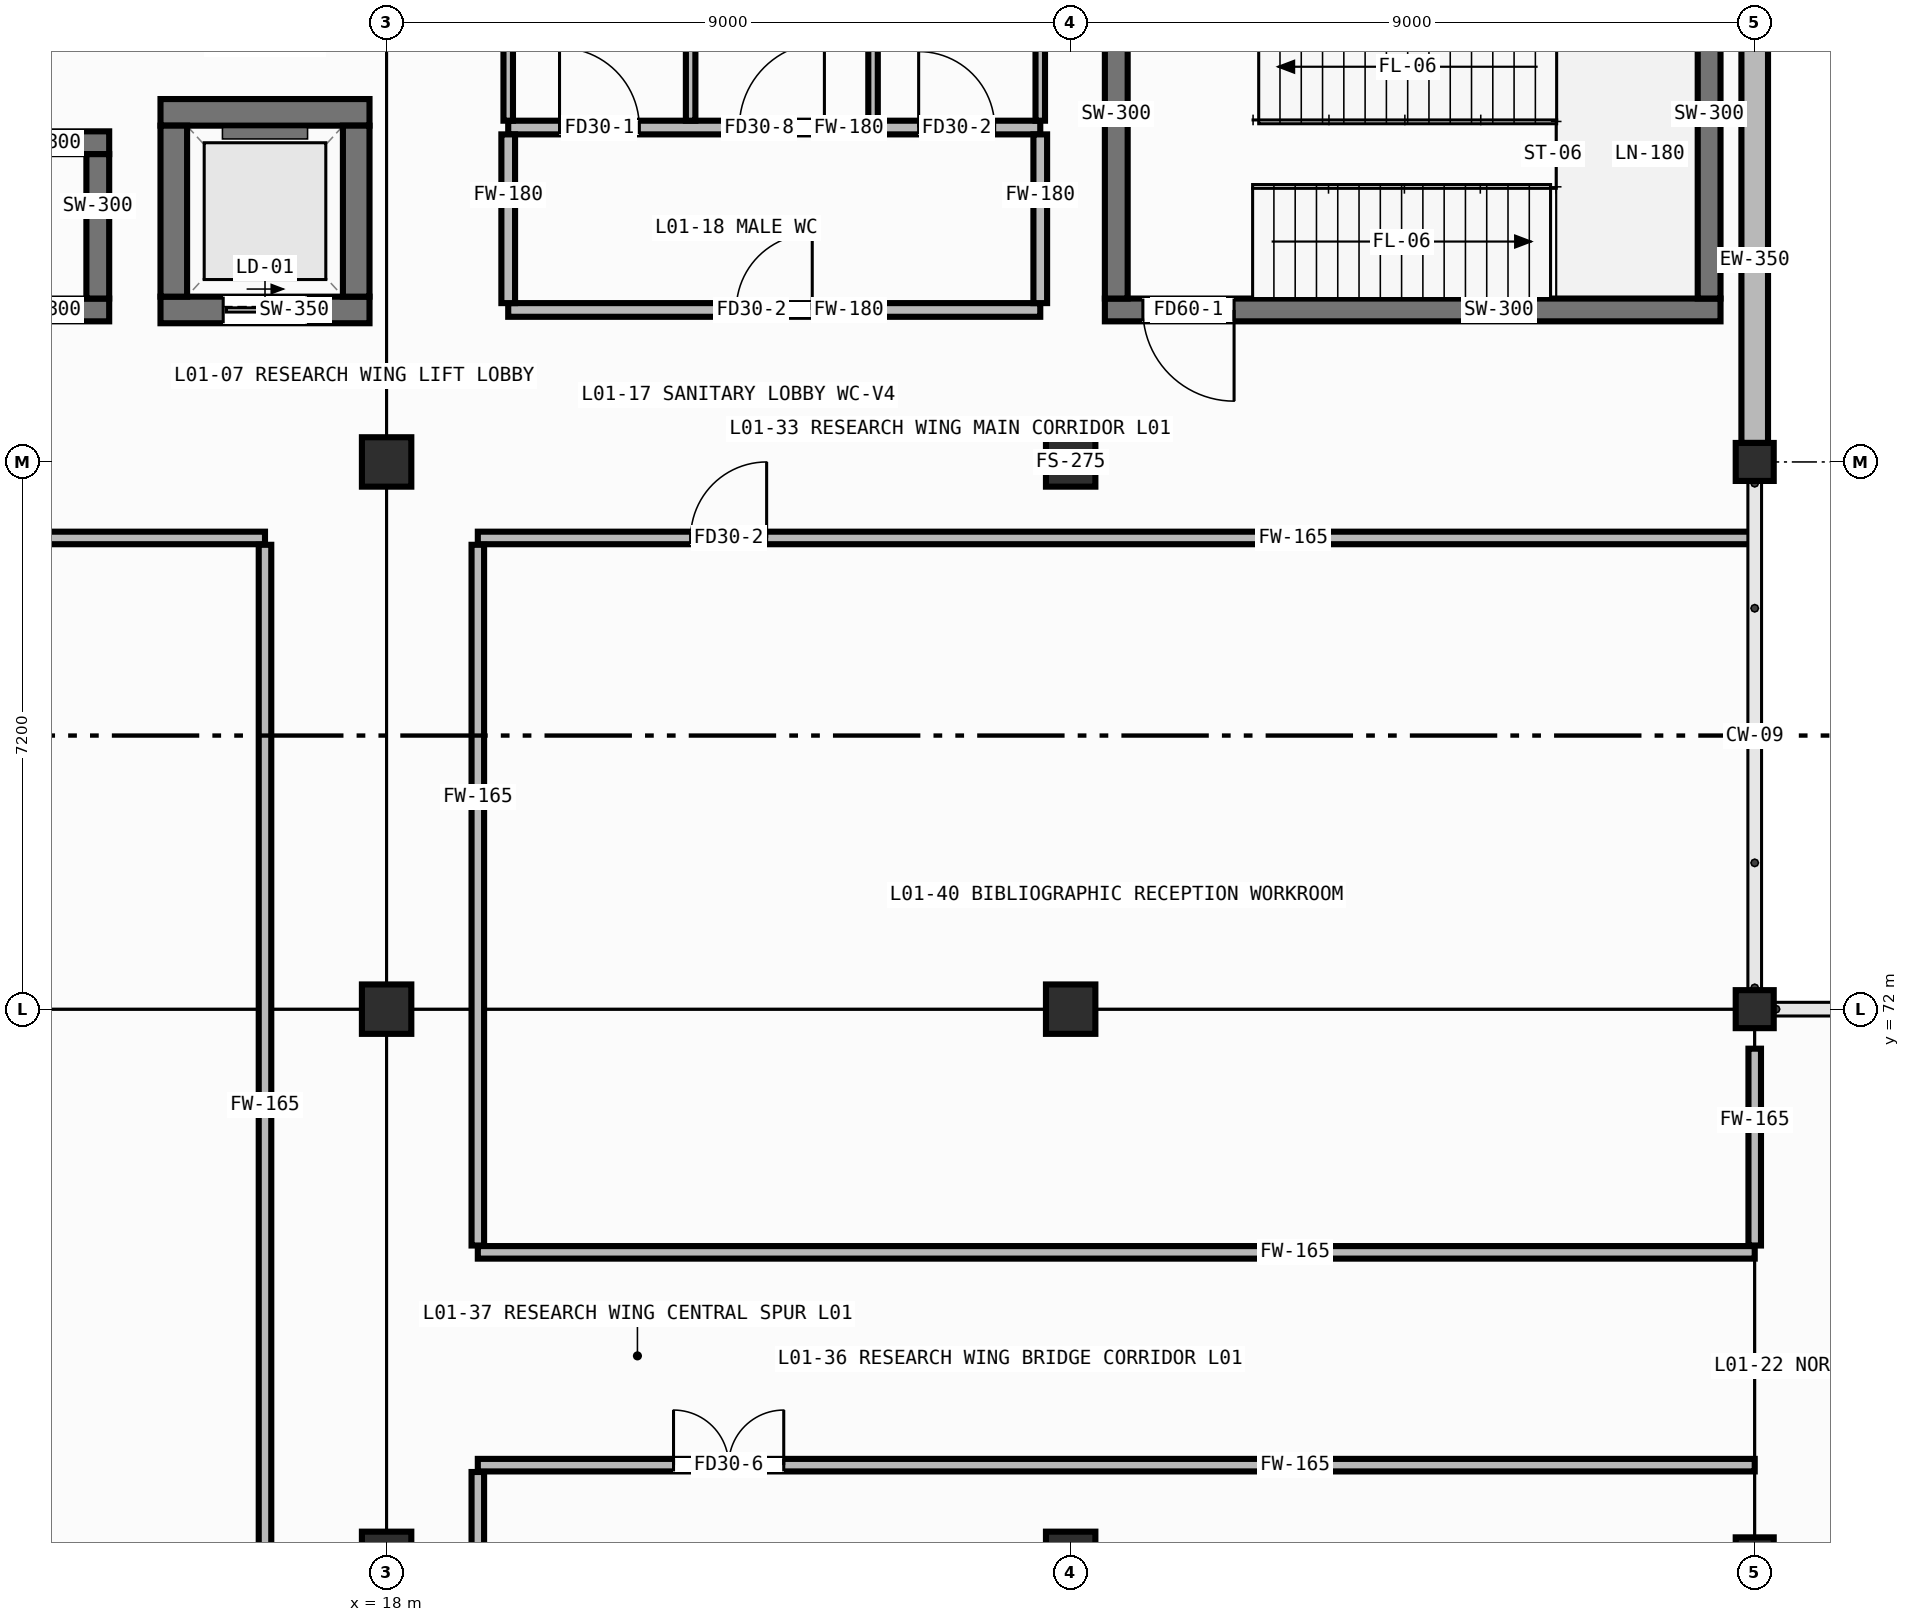
"""IFC4 building model, lengths in metres.
Left out: names, types, materials, properties, quantities, classifications, styles, units other than length and angle.
Written with IfcOpenShell. Run it as: python <this file> out.ifc"""

import sys

from ifc_helpers import new_model, si_unit, direction, frame, frame_2d, origin, origin_2d, place, context, subcontext, project, spatial, rectangle, hollow_rectangle, extrude, element, fill, save


model = new_model("IFC4")
c1 = context("Model", 3, precision=1e-05, world=origin(), true_north=direction((0.0, 1.0)))
c2 = subcontext(c1, "Body", "Model", "MODEL_VIEW")
j1 = project(units=[si_unit("LENGTHUNIT", "METRE"), si_unit("PLANEANGLEUNIT", "RADIAN")], contexts=[c1])
p1 = place(None, origin())
s1 = spatial("IfcSite", under=j1, at=p1, CompositionType="ELEMENT")
p2 = place(p1, origin())
s2 = spatial("IfcBuilding", under=s1, at=p2, CompositionType="ELEMENT")
p3 = place(p2, origin())
s3 = spatial("IfcBuildingStorey", under=s2, at=p3, CompositionType="ELEMENT", Elevation=0.0)
for number, where, z_axis, x_axis in (
    (1, (18.0, 64.8, 0.0), (0.0, 0.0, 1.0), (1.0, 0.0, 0.0)),
    (2, (18.0, 72.0, 0.0), (0.0, 0.0, 1.0), (1.0, 0.0, 0.0)),
    (3, (18.0, 79.2, 0.0), (0.0, 0.0, 1.0), (1.0, 0.0, 0.0)),
    (4, (27.0, 64.8, 0.0), (0.0, 0.0, 1.0), (1.0, 0.0, 0.0)),
    (5, (27.0, 72.0, 0.0), (0.0, 0.0, 1.0), (1.0, 0.0, 0.0)),
    (6, (27.0, 79.2, 0.0), (0.0, 0.0, 1.0), (1.0, 0.0, 0.0)),
):
    element("IfcColumn", number, at=place(p3, frame(where, z_axis=z_axis, x_axis=x_axis)), inside=s3, PredefinedType="COLUMN", context=c2, shape_type="SweptSolid", body=[
        extrude(hollow_rectangle(XDim=0.65, YDim=0.65, WallThickness=0.025, at=origin_2d()), origin(), (0.0, 0.0, 1.0), 4.8),
    ])
for number, where, z_axis, x_axis in (
    (7, (36.0, 64.8, 0.0), (0.0, 0.0, 1.0), (1.0, 0.0, 0.0)),
    (8, (36.0, 72.0, 0.0), (0.0, 0.0, 1.0), (1.0, 0.0, 0.0)),
    (9, (36.0, 79.2, 0.0), (0.0, 0.0, 1.0), (1.0, 0.0, 0.0)),
):
    element("IfcColumn", number, at=place(p3, frame(where, z_axis=z_axis, x_axis=x_axis)), inside=s3, PredefinedType="COLUMN", context=c2, shape_type="SweptSolid", body=[
        extrude(hollow_rectangle(XDim=0.5, YDim=0.5, WallThickness=0.022, at=origin_2d()), origin(), (0.0, 0.0, 1.0), 4.8),
    ])
p4 = place(p3, frame((36.0, 86.15, 0.0), z_axis=(0.0, 0.0, 1.0), x_axis=(0.0, -1.0, 0.0)))
e10 = element("IfcWall", 10, at=p4, inside=s3, PredefinedType="STANDARD", context=c2, shape_type="SweptSolid", body=[
    extrude(rectangle(XDim=6.7, YDim=0.35, at=frame_2d((3.35, 0.0))), origin(), (0.0, 0.0, 1.0), 4.055),
])
p5 = place(p3, frame((27.45, 81.2, 0.0), z_axis=(0.0, 0.0, 1.0), x_axis=(1.0, 0.0, 0.0)))
e11 = element("IfcWall", 11, at=p5, inside=s3, PredefinedType="SHEAR", context=c2, shape_type="SweptSolid", body=[
    extrude(rectangle(XDim=8.1, YDim=0.3, at=frame_2d((4.05, 0.0))), origin(), (0.0, 0.0, 1.0), 4.555),
])
p6 = place(p5, frame((0.5, 0.0, 0.0)))
e12 = element("IfcOpeningElement", 12, at=p6, cuts=e11, PredefinedType="OPENING", context=c2, shape_type="SweptSolid", body=[
    extrude(rectangle(XDim=1.2, YDim=2.1, at=frame_2d((0.6, 1.05))), frame((0.0, 0.162, 0.0), z_axis=(0.0, -1.0, 0.0), x_axis=(1.0, 0.0, 0.0)), (0.0, 0.0, 1.0), 0.324),
])
for number, where, z_axis, x_axis in (
    (13, (27.6, 81.35, 0.0), (0.0, 0.0, 1.0), (0.0, 1.0, 0.0)),
    (14, (35.4, 81.35, 0.0), (0.0, 0.0, 1.0), (0.0, 1.0, 0.0)),
):
    element("IfcWall", number, at=place(p3, frame(where, z_axis=z_axis, x_axis=x_axis)), inside=s3, PredefinedType="SHEAR", context=c2, shape_type="SweptSolid", body=[
        extrude(rectangle(XDim=3.8, YDim=0.3, at=frame_2d((1.9, 0.0))), origin(), (0.0, 0.0, 1.0), 4.555),
    ])
p7 = place(p3, frame((15.025, 81.2, 0.0), z_axis=(0.0, 0.0, 1.0), x_axis=(1.0, 0.0, 0.0)))
e15 = element("IfcWall", 15, at=p7, inside=s3, PredefinedType="SHEAR", context=c2, shape_type="SweptSolid", body=[
    extrude(rectangle(XDim=2.75, YDim=0.35, at=frame_2d((1.375, 0.0))), origin(), (0.0, 0.0, 1.0), 4.555),
])
p8 = place(p7, frame((0.825, 0.0, 0.0)))
e16 = element("IfcOpeningElement", 16, at=p8, cuts=e15, PredefinedType="OPENING", context=c2, shape_type="SweptSolid", body=[
    extrude(rectangle(XDim=1.1, YDim=2.1, at=frame_2d((0.55, 1.05))), frame((0.0, 0.187, 0.0), z_axis=(0.0, -1.0, 0.0), x_axis=(1.0, 0.0, 0.0)), (0.0, 0.0, 1.0), 0.374),
])
p9 = place(p3, frame((15.025, 83.8, 0.0), z_axis=(0.0, 0.0, 1.0), x_axis=(1.0, 0.0, 0.0)))
e17 = element("IfcWall", 17, at=p9, inside=s3, PredefinedType="SHEAR", context=c2, shape_type="SweptSolid", body=[
    extrude(rectangle(XDim=2.75, YDim=0.35, at=frame_2d((1.375, 0.0))), origin(), (0.0, 0.0, 1.0), 4.555),
])
for number, where, z_axis, x_axis in (
    (18, (15.2, 81.375, 0.0), (0.0, 0.0, 1.0), (0.0, 1.0, 0.0)),
    (19, (17.6, 81.375, 0.0), (0.0, 0.0, 1.0), (0.0, 1.0, 0.0)),
):
    element("IfcWall", number, at=place(p3, frame(where, z_axis=z_axis, x_axis=x_axis)), inside=s3, PredefinedType="SHEAR", context=c2, shape_type="SweptSolid", body=[
        extrude(rectangle(XDim=2.25, YDim=0.35, at=frame_2d((1.125, 0.0))), origin(), (0.0, 0.0, 1.0), 4.555),
    ])
for number, where, z_axis, x_axis in (
    (20, (12.05, 81.2, 0.0), (0.0, 0.0, 1.0), (1.0, 0.0, 0.0)),
    (21, (12.05, 83.4, 0.0), (0.0, 0.0, 1.0), (1.0, 0.0, 0.0)),
):
    element("IfcWall", number, at=place(p3, frame(where, z_axis=z_axis, x_axis=x_axis)), inside=s3, PredefinedType="SHEAR", context=c2, shape_type="SweptSolid", body=[
        extrude(rectangle(XDim=2.3, YDim=0.3, at=frame_2d((1.15, 0.0))), origin(), (0.0, 0.0, 1.0), 4.555),
    ])
p10 = place(p3, frame((14.2, 81.35, 0.0), z_axis=(0.0, 0.0, 1.0), x_axis=(0.0, 1.0, 0.0)))
e22 = element("IfcWall", 22, at=p10, inside=s3, PredefinedType="SHEAR", context=c2, shape_type="SweptSolid", body=[
    extrude(rectangle(XDim=1.9, YDim=0.3, at=frame_2d((0.95, 0.0))), origin(), (0.0, 0.0, 1.0), 4.555),
])
p11 = place(p3, frame((19.6, 81.2, 0.0), z_axis=(0.0, 0.0, 1.0), x_axis=(1.0, 0.0, 0.0)))
e23 = element("IfcWall", 23, at=p11, inside=s3, PredefinedType="PARTITIONING", context=c2, shape_type="SweptSolid", body=[
    extrude(rectangle(XDim=7.0, YDim=0.18, at=frame_2d((3.5, 0.0))), origin(), (0.0, 0.0, 1.0), 4.555),
])
p12 = place(p11, frame((3.0, 0.0, 0.0)))
e24 = element("IfcOpeningElement", 24, at=p12, cuts=e23, PredefinedType="OPENING", context=c2, shape_type="SweptSolid", body=[
    extrude(rectangle(XDim=1.0, YDim=2.08, at=frame_2d((0.5, 1.04))), frame((0.0, 0.102, 0.0), z_axis=(0.0, -1.0, 0.0), x_axis=(1.0, 0.0, 0.0)), (0.0, 0.0, 1.0), 0.204),
])
p13 = place(p3, frame((19.6, 83.6, 0.0), z_axis=(0.0, 0.0, 1.0), x_axis=(1.0, 0.0, 0.0)))
e25 = element("IfcWall", 25, at=p13, inside=s3, PredefinedType="PARTITIONING", context=c2, shape_type="SweptSolid", body=[
    extrude(rectangle(XDim=7.0, YDim=0.18, at=frame_2d((3.5, 0.0))), origin(), (0.0, 0.0, 1.0), 4.555),
])
p14 = place(p13, frame((0.675, 0.0, 0.0)))
e26 = element("IfcOpeningElement", 26, at=p14, cuts=e25, PredefinedType="OPENING", context=c2, shape_type="SweptSolid", body=[
    extrude(rectangle(XDim=1.05, YDim=2.1, at=frame_2d((0.525, 1.05))), frame((0.0, 0.102, 0.0), z_axis=(0.0, -1.0, 0.0), x_axis=(1.0, 0.0, 0.0)), (0.0, 0.0, 1.0), 0.204),
])
p15 = place(p13, frame((3.04, 0.0, 0.0)))
e27 = element("IfcOpeningElement", 27, at=p15, cuts=e25, PredefinedType="OPENING", context=c2, shape_type="SweptSolid", body=[
    extrude(rectangle(XDim=1.12, YDim=2.08, at=frame_2d((0.56, 1.04))), frame((0.0, 0.102, 0.0), z_axis=(0.0, -1.0, 0.0), x_axis=(1.0, 0.0, 0.0)), (0.0, 0.0, 1.0), 0.204),
])
p16 = place(p13, frame((5.4, 0.0, 0.0)))
e28 = element("IfcOpeningElement", 28, at=p16, cuts=e25, PredefinedType="OPENING", context=c2, shape_type="SweptSolid", body=[
    extrude(rectangle(XDim=1.0, YDim=2.08, at=frame_2d((0.5, 1.04))), frame((0.0, 0.102, 0.0), z_axis=(0.0, -1.0, 0.0), x_axis=(1.0, 0.0, 0.0)), (0.0, 0.0, 1.0), 0.204),
])
for number, where, z_axis, x_axis in (
    (29, (19.6, 81.29, 0.0), (0.0, 0.0, 1.0), (0.0, 1.0, 0.0)),
    (30, (26.6, 81.29, 0.0), (0.0, 0.0, 1.0), (0.0, 1.0, 0.0)),
):
    element("IfcWall", number, at=place(p3, frame(where, z_axis=z_axis, x_axis=x_axis)), inside=s3, PredefinedType="PARTITIONING", context=c2, shape_type="SweptSolid", body=[
        extrude(rectangle(XDim=2.22, YDim=0.18, at=frame_2d((1.11, 0.0))), origin(), (0.0, 0.0, 1.0), 4.555),
    ])
for number, where, z_axis, x_axis in (
    (31, (19.6, 83.69, 0.0), (0.0, 0.0, 1.0), (0.0, 1.0, 0.0)),
    (32, (22.0, 83.69, 0.0), (0.0, 0.0, 1.0), (0.0, 1.0, 0.0)),
    (33, (24.4, 83.69, 0.0), (0.0, 0.0, 1.0), (0.0, 1.0, 0.0)),
    (34, (26.6, 83.69, 0.0), (0.0, 0.0, 1.0), (0.0, 1.0, 0.0)),
):
    element("IfcWall", number, at=place(p3, frame(where, z_axis=z_axis, x_axis=x_axis)), inside=s3, PredefinedType="PARTITIONING", context=c2, shape_type="SweptSolid", body=[
        extrude(rectangle(XDim=2.448, YDim=0.125, at=frame_2d((1.224, 0.0))), origin(), (0.0, 0.0, 1.0), 4.555),
    ])
p17 = place(p3, frame((0.18, 78.2, 0.0), z_axis=(0.0, 0.0, 1.0), x_axis=(1.0, 0.0, 0.0)))
e35 = element("IfcWall", 35, at=p17, inside=s3, PredefinedType="PARTITIONING", context=c2, shape_type="SweptSolid", body=[
    extrude(rectangle(XDim=16.22, YDim=0.165, at=frame_2d((8.11, 0.0))), origin(), (0.0, 0.0, 1.0), 4.555),
])
p18 = place(p17, frame((3.47, 0.0, 0.0)))
e36 = element("IfcOpeningElement", 36, at=p18, cuts=e35, PredefinedType="OPENING", context=c2, shape_type="SweptSolid", body=[
    extrude(rectangle(XDim=1.7, YDim=2.12, at=frame_2d((0.85, 1.06))), frame((0.0, 0.094, 0.0), z_axis=(0.0, -1.0, 0.0), x_axis=(1.0, 0.0, 0.0)), (0.0, 0.0, 1.0), 0.189),
])
p19 = place(p3, frame((16.4, 57.635, 0.0), z_axis=(0.0, 0.0, 1.0), x_axis=(0.0, 1.0, 0.0)))
e37 = element("IfcWall", 37, at=p19, inside=s3, PredefinedType="PARTITIONING", context=c2, shape_type="SweptSolid", body=[
    extrude(rectangle(XDim=20.475, YDim=0.165, at=frame_2d((10.238, 0.0))), origin(), (0.0, 0.0, 1.0), 4.555),
])
p20 = place(p3, frame((19.2, 66.0, 0.0), z_axis=(0.0, 0.0, 1.0), x_axis=(1.0, 0.0, 0.0)))
e38 = element("IfcWall", 38, at=p20, inside=s3, PredefinedType="PARTITIONING", context=c2, shape_type="SweptSolid", body=[
    extrude(rectangle(XDim=16.8, YDim=0.165, at=frame_2d((8.4, 0.0))), origin(), (0.0, 0.0, 1.0), 4.555),
])
p21 = place(p20, frame((2.575, 0.0, 0.0)))
e39 = element("IfcOpeningElement", 39, at=p21, cuts=e38, PredefinedType="OPENING", context=c2, shape_type="SweptSolid", body=[
    extrude(rectangle(XDim=1.45, YDim=2.1, at=frame_2d((0.725, 1.05))), frame((0.0, 0.094, 0.0), z_axis=(0.0, -1.0, 0.0), x_axis=(1.0, 0.0, 0.0)), (0.0, 0.0, 1.0), 0.189),
])
p22 = place(p3, frame((19.2, 57.78, 0.0), z_axis=(0.0, 0.0, 1.0), x_axis=(0.0, 1.0, 0.0)))
e40 = element("IfcWall", 40, at=p22, inside=s3, PredefinedType="PARTITIONING", context=c2, shape_type="SweptSolid", body=[
    extrude(rectangle(XDim=8.13, YDim=0.165, at=frame_2d((4.065, 0.0))), origin(), (0.0, 0.0, 1.0), 4.555),
])
p23 = place(p3, frame((19.2, 68.8, 0.0), z_axis=(0.0, 0.0, 1.0), x_axis=(1.0, 0.0, 0.0)))
e41 = element("IfcWall", 41, at=p23, inside=s3, PredefinedType="PARTITIONING", context=c2, shape_type="SweptSolid", body=[
    extrude(rectangle(XDim=16.8, YDim=0.165, at=frame_2d((8.4, 0.0))), origin(), (0.0, 0.0, 1.0), 4.555),
])
p24 = place(p3, frame((19.2, 78.2, 0.0), z_axis=(0.0, 0.0, 1.0), x_axis=(1.0, 0.0, 0.0)))
e42 = element("IfcWall", 42, at=p24, inside=s3, PredefinedType="PARTITIONING", context=c2, shape_type="SweptSolid", body=[
    extrude(rectangle(XDim=16.765, YDim=0.165, at=frame_2d((8.383, 0.0))), origin(), (0.0, 0.0, 1.0), 4.555),
])
p25 = place(p24, frame((2.8, 0.0, 0.0)))
e43 = element("IfcOpeningElement", 43, at=p25, cuts=e42, PredefinedType="OPENING", context=c2, shape_type="SweptSolid", body=[
    extrude(rectangle(XDim=1.0, YDim=2.08, at=frame_2d((0.5, 1.04))), frame((0.0, 0.094, 0.0), z_axis=(0.0, -1.0, 0.0), x_axis=(1.0, 0.0, 0.0)), (0.0, 0.0, 1.0), 0.189),
])
p26 = place(p3, frame((19.2, 68.89, 0.0), z_axis=(0.0, 0.0, 1.0), x_axis=(0.0, 1.0, 0.0)))
e44 = element("IfcWall", 44, at=p26, inside=s3, PredefinedType="PARTITIONING", context=c2, shape_type="SweptSolid", body=[
    extrude(rectangle(XDim=9.22, YDim=0.165, at=frame_2d((4.61, 0.0))), origin(), (0.0, 0.0, 1.0), 4.555),
])
p27 = place(p3, frame((36.0, 68.89, 0.0), z_axis=(0.0, 0.0, 1.0), x_axis=(0.0, 1.0, 0.0)))
e45 = element("IfcWall", 45, at=p27, inside=s3, PredefinedType="PARTITIONING", context=c2, shape_type="SweptSolid", body=[
    extrude(rectangle(XDim=2.59, YDim=0.165, at=frame_2d((1.295, 0.0))), origin(), (0.0, 0.0, 1.0), 3.835),
])
p28 = place(p6, frame((1.2, 0.0, 0.0), z_axis=(0.0, 0.0, 1.0), x_axis=(-1.0, 0.0, 0.0)))
e46 = element("IfcDoor", 46, at=p28, inside=s3, OperationType="SINGLE_SWING_LEFT", PredefinedType="DOOR", context=c2, shape_type="SweptSolid", body=[
    extrude(rectangle(XDim=1.2, YDim=2.1, at=frame_2d((0.6, 1.05))), frame((0.0, 0.025, 0.0), z_axis=(0.0, -1.0, 0.0), x_axis=(1.0, 0.0, 0.0)), (0.0, 0.0, 1.0), 0.05),
])
fill(e12, e46)
p29 = place(p8, origin())
e47 = element("IfcDoor", 47, at=p29, inside=s3, OperationType="SLIDING_TO_LEFT", PredefinedType="DOOR", context=c2, shape_type="SweptSolid", body=[
    extrude(rectangle(XDim=1.1, YDim=2.1, at=frame_2d((0.55, 1.05))), frame((0.0, 0.025, 0.0), z_axis=(0.0, -1.0, 0.0), x_axis=(1.0, 0.0, 0.0)), (0.0, 0.0, 1.0), 0.05),
])
fill(e16, e47)
p30 = place(p12, origin())
e48 = element("IfcDoor", 48, at=p30, inside=s3, OperationType="SINGLE_SWING_RIGHT", PredefinedType="DOOR", context=c2, shape_type="SweptSolid", body=[
    extrude(rectangle(XDim=1.0, YDim=2.08, at=frame_2d((0.5, 1.04))), frame((0.0, 0.025, 0.0), z_axis=(0.0, -1.0, 0.0), x_axis=(1.0, 0.0, 0.0)), (0.0, 0.0, 1.0), 0.05),
])
fill(e24, e48)
p31 = place(p14, origin())
e49 = element("IfcDoor", 49, at=p31, inside=s3, OperationType="SINGLE_SWING_LEFT", PredefinedType="DOOR", context=c2, shape_type="SweptSolid", body=[
    extrude(rectangle(XDim=1.05, YDim=2.1, at=frame_2d((0.525, 1.05))), frame((0.0, 0.025, 0.0), z_axis=(0.0, -1.0, 0.0), x_axis=(1.0, 0.0, 0.0)), (0.0, 0.0, 1.0), 0.05),
])
fill(e26, e49)
p32 = place(p15, origin())
e50 = element("IfcDoor", 50, at=p32, inside=s3, OperationType="SINGLE_SWING_RIGHT", PredefinedType="DOOR", context=c2, shape_type="SweptSolid", body=[
    extrude(rectangle(XDim=1.12, YDim=2.08, at=frame_2d((0.56, 1.04))), frame((0.0, 0.025, 0.0), z_axis=(0.0, -1.0, 0.0), x_axis=(1.0, 0.0, 0.0)), (0.0, 0.0, 1.0), 0.05),
])
fill(e27, e50)
p33 = place(p16, origin())
e51 = element("IfcDoor", 51, at=p33, inside=s3, OperationType="SINGLE_SWING_LEFT", PredefinedType="DOOR", context=c2, shape_type="SweptSolid", body=[
    extrude(rectangle(XDim=1.0, YDim=2.08, at=frame_2d((0.5, 1.04))), frame((0.0, 0.025, 0.0), z_axis=(0.0, -1.0, 0.0), x_axis=(1.0, 0.0, 0.0)), (0.0, 0.0, 1.0), 0.05),
])
fill(e28, e51)
p34 = place(p21, origin())
e52 = element("IfcDoor", 52, at=p34, inside=s3, OperationType="DOUBLE_DOOR_SINGLE_SWING", PredefinedType="DOOR", context=c2, shape_type="SweptSolid", body=[
    extrude(rectangle(XDim=1.45, YDim=2.1, at=frame_2d((0.725, 1.05))), frame((0.0, 0.025, 0.0), z_axis=(0.0, -1.0, 0.0), x_axis=(1.0, 0.0, 0.0)), (0.0, 0.0, 1.0), 0.05),
])
fill(e39, e52)
p35 = place(p25, origin())
e53 = element("IfcDoor", 53, at=p35, inside=s3, OperationType="SINGLE_SWING_RIGHT", PredefinedType="DOOR", context=c2, shape_type="SweptSolid", body=[
    extrude(rectangle(XDim=1.0, YDim=2.08, at=frame_2d((0.5, 1.04))), frame((0.0, 0.025, 0.0), z_axis=(0.0, -1.0, 0.0), x_axis=(1.0, 0.0, 0.0)), (0.0, 0.0, 1.0), 0.05),
])
fill(e43, e53)
save(model, sys.argv[1])
